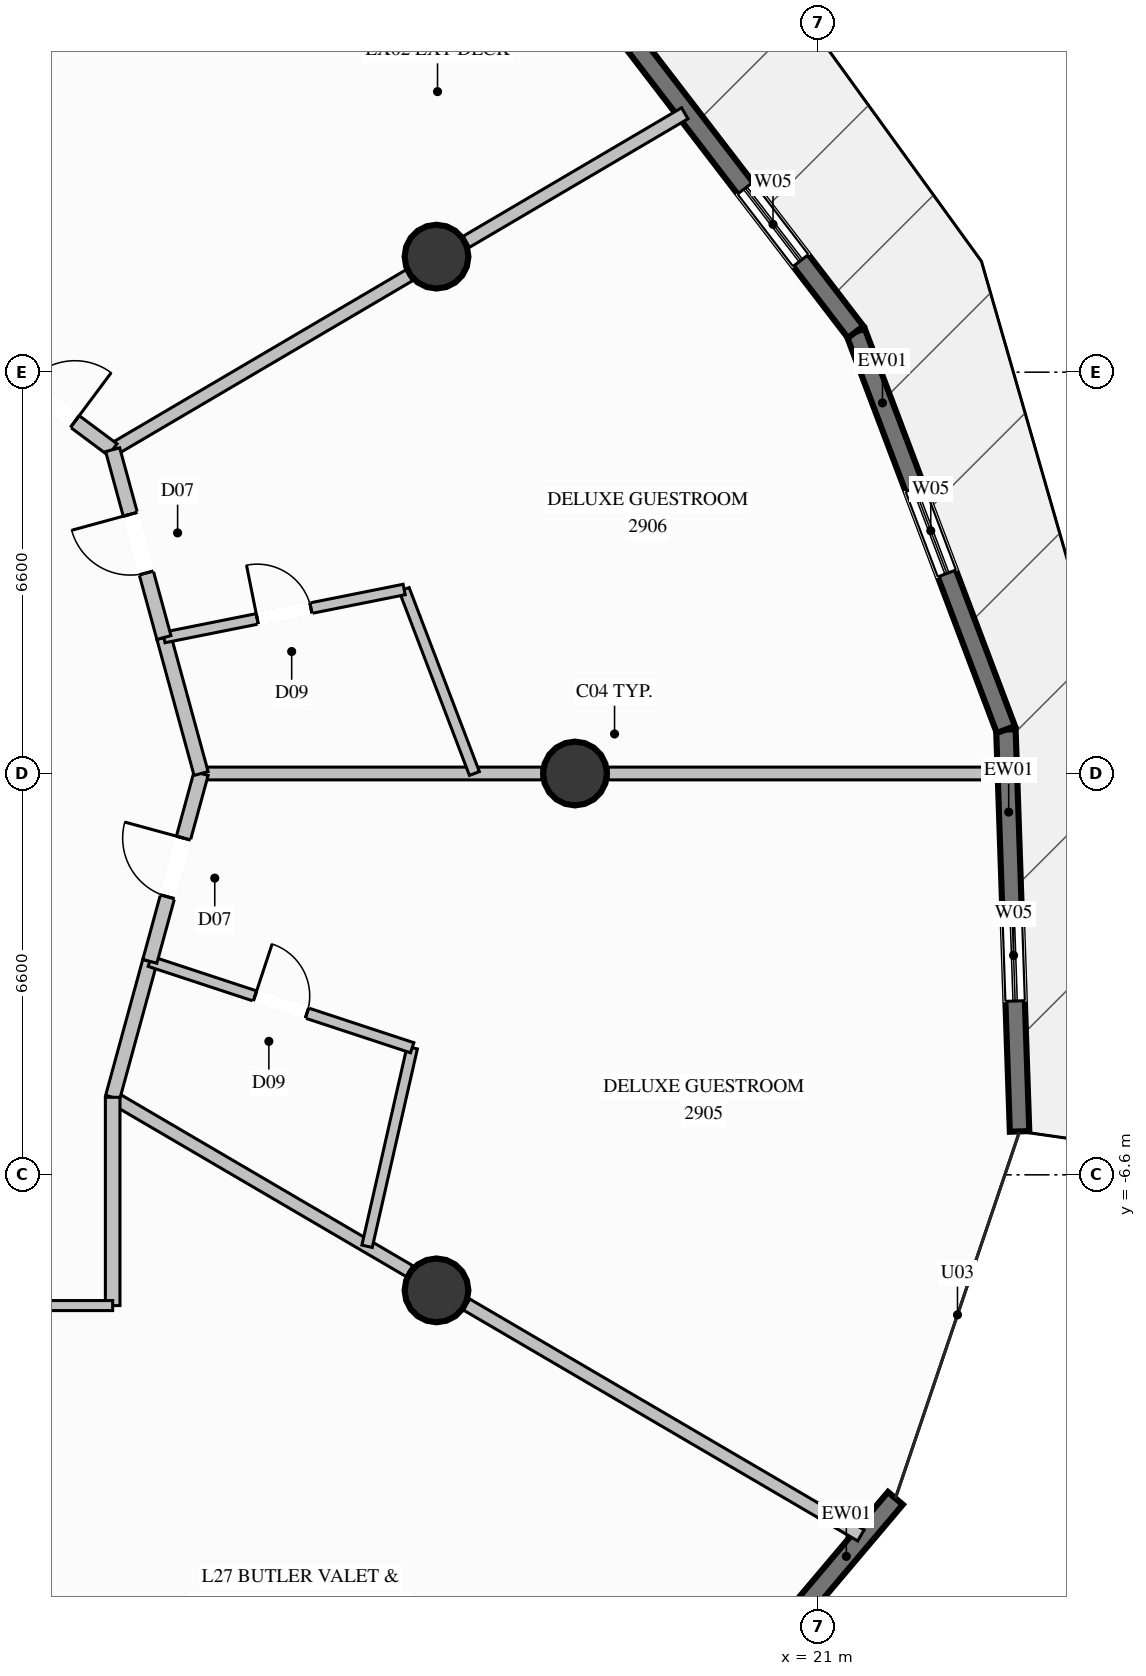
"""IFC4 building model, lengths in metres.
Left out: names, types, materials, properties, quantities, classifications, styles, units other than length and angle.
Written with IfcOpenShell. Run it as: python <this file> out.ifc"""

import sys

from ifc_helpers import new_model, si_unit, direction, frame, frame_2d, origin, origin_2d, place, context, subcontext, project, spatial, rectangle, circle, extrude, element, fill, save


model = new_model("IFC4")
c1 = context("Model", 3, precision=1e-05, world=origin(), true_north=direction((0.0, 1.0)))
c2 = subcontext(c1, "Body", "Model", "MODEL_VIEW")
j1 = project(units=[si_unit("LENGTHUNIT", "METRE"), si_unit("PLANEANGLEUNIT", "RADIAN")], contexts=[c1])
p1 = place(None, origin())
s1 = spatial("IfcSite", under=j1, at=p1, CompositionType="ELEMENT")
p2 = place(p1, origin())
s2 = spatial("IfcBuilding", under=s1, at=p2, CompositionType="ELEMENT")
p3 = place(p2, frame((0.0, 0.0, 109.8)))
s3 = spatial("IfcBuildingStorey", under=s2, at=p3, CompositionType="ELEMENT", Elevation=109.8)
for number, where, z_axis, x_axis in (
    (1, (17.0, 0.0, 0.0), (0.0, 0.0, 1.0), (1.0, 0.0, 0.0)),
    (2, (14.722, 8.5, 0.0), (0.0, 0.0, 1.0), (1.0, 0.0, 0.0)),
    (3, (14.722, -8.5, 0.0), (0.0, 0.0, 1.0), (1.0, 0.0, 0.0)),
):
    element("IfcColumn", number, at=place(p3, frame(where, z_axis=z_axis, x_axis=x_axis)), inside=s3, PredefinedType="COLUMN", context=c2, shape_type="SweptSolid", body=[
        extrude(circle(Radius=0.525, at=origin_2d()), origin(), (0.0, 0.0, 1.0), 3.6),
    ])
p4 = place(p3, frame((24.086, 0.723, 0.0), z_axis=(0.0, 0.0, 1.0), x_axis=(0.034040106065, -0.999420467661, 0.0)))
e4 = element("IfcWall", 4, at=p4, inside=s3, PredefinedType="SOLIDWALL", context=c2, shape_type="SweptSolid", body=[
    extrude(rectangle(XDim=6.613, YDim=0.32, at=frame_2d((3.306, 0.0))), origin(), (0.0, 0.0, 1.0), 3.35),
])
p5 = place(p4, frame((2.967, 0.0, 0.85)))
e5 = element("IfcOpeningElement", 5, at=p5, cuts=e4, PredefinedType="OPENING", context=c2, shape_type="SweptSolid", body=[
    extrude(rectangle(XDim=1.5, YDim=1.2, at=frame_2d((0.75, 0.6))), frame((0.0, 0.17, 0.0), z_axis=(0.0, -1.0, 0.0), x_axis=(1.0, 0.0, 0.0)), (0.0, 0.0, 1.0), 0.34),
])
p6 = place(p3, frame((21.615, 7.261, 0.0), z_axis=(0.0, 0.0, 1.0), x_axis=(0.353526231911, -0.93542461126, 0.0)))
e6 = element("IfcWall", 6, at=p6, inside=s3, PredefinedType="SOLIDWALL", context=c2, shape_type="SweptSolid", body=[
    extrude(rectangle(XDim=6.99, YDim=0.32, at=frame_2d((3.495, 0.0))), origin(), (0.0, 0.0, 1.0), 3.35),
])
p7 = place(p6, frame((2.745, 0.0, 0.85)))
e7 = element("IfcOpeningElement", 7, at=p7, cuts=e6, PredefinedType="OPENING", context=c2, shape_type="SweptSolid", body=[
    extrude(rectangle(XDim=1.5, YDim=1.2, at=frame_2d((0.75, 0.6))), frame((0.0, 0.17, 0.0), z_axis=(0.0, -1.0, 0.0), x_axis=(1.0, 0.0, 0.0)), (0.0, 0.0, 1.0), 0.34),
])
p8 = place(p3, frame((17.142, 13.089, 0.0), z_axis=(0.0, 0.0, 1.0), x_axis=(0.608831916989, -0.793299247986, 0.0)))
e8 = element("IfcWall", 8, at=p8, inside=s3, PredefinedType="SOLIDWALL", context=c2, shape_type="SweptSolid", body=[
    extrude(rectangle(XDim=7.347, YDim=0.32, at=frame_2d((3.673, 0.0))), origin(), (0.0, 0.0, 1.0), 3.35),
])
p9 = place(p8, frame((4.365, 0.0, 0.85)))
e9 = element("IfcOpeningElement", 9, at=p9, cuts=e8, PredefinedType="OPENING", context=c2, shape_type="SweptSolid", body=[
    extrude(rectangle(XDim=1.5, YDim=1.2, at=frame_2d((0.75, 0.6))), frame((0.0, 0.17, 0.0), z_axis=(0.0, -1.0, 0.0), x_axis=(1.0, 0.0, 0.0)), (0.0, 0.0, 1.0), 0.34),
])
p10 = place(p3, frame((22.269, -11.919, 0.0), z_axis=(0.0, 0.0, 1.0), x_axis=(-0.645278763483, -0.763947195425, 0.0)))
e10 = element("IfcWall", 10, at=p10, inside=s3, PredefinedType="SOLIDWALL", context=c2, shape_type="SweptSolid", body=[
    extrude(rectangle(XDim=6.369, YDim=0.32, at=frame_2d((3.185, 0.0))), origin(), (0.0, 0.0, 1.0), 3.35),
])
p11 = place(p10, frame((2.751, 0.0, 0.35)))
e11 = element("IfcOpeningElement", 11, at=p11, cuts=e10, PredefinedType="OPENING", context=c2, shape_type="SweptSolid", body=[
    extrude(rectangle(XDim=1.8, YDim=2.6, at=frame_2d((0.9, 1.3))), frame((0.0, 0.17, 0.0), z_axis=(0.0, -1.0, 0.0), x_axis=(1.0, 0.0, 0.0)), (0.0, 0.0, 1.0), 0.34),
])
p12 = place(p3, frame((10.85, 0.0, 0.0), z_axis=(0.0, 0.0, 1.0), x_axis=(1.0, 0.0, 0.0)))
e12 = element("IfcWall", 12, at=p12, inside=s3, PredefinedType="PARTITIONING", context=c2, shape_type="SweptSolid", body=[
    extrude(rectangle(XDim=5.605, YDim=0.21, at=frame_2d((2.802, 0.0))), origin(), (0.0, 0.0, 1.0), 2.421),
])
p13 = place(p3, frame((17.545, 0.0, 0.0), z_axis=(0.0, 0.0, 1.0), x_axis=(1.0, 0.0, 0.0)))
e13 = element("IfcWall", 13, at=p13, inside=s3, PredefinedType="PARTITIONING", context=c2, shape_type="SweptSolid", body=[
    extrude(rectangle(XDim=6.526, YDim=0.21, at=frame_2d((3.263, 0.0))), origin(), (0.0, 0.0, 1.0), 2.421),
])
p14 = place(p3, frame((9.396, 5.325, 0.0), z_axis=(0.0, 0.0, 1.0), x_axis=(0.862032950085, 0.506852239778, 0.0)))
e14 = element("IfcWall", 14, at=p14, inside=s3, PredefinedType="PARTITIONING", context=c2, shape_type="SweptSolid", body=[
    extrude(rectangle(XDim=5.656, YDim=0.21, at=frame_2d((2.828, 0.0))), origin(), (0.0, 0.0, 1.0), 2.791),
])
p15 = place(p3, frame((15.21, 8.743, 0.0), z_axis=(0.0, 0.0, 1.0), x_axis=(0.862004936616, 0.506899880894, 0.0)))
e15 = element("IfcWall", 15, at=p15, inside=s3, PredefinedType="PARTITIONING", context=c2, shape_type="SweptSolid", body=[
    extrude(rectangle(XDim=4.17, YDim=0.21, at=frame_2d((2.085, 0.0))), origin(), (0.0, 0.0, 1.0), 3.35),
])
p16 = place(p3, frame((9.396, -5.325, 0.0), z_axis=(0.0, 0.0, 1.0), x_axis=(0.862912125579, -0.505353998232, 0.0)))
e16 = element("IfcWall", 16, at=p16, inside=s3, PredefinedType="PARTITIONING", context=c2, shape_type="SweptSolid", body=[
    extrude(rectangle(XDim=5.658, YDim=0.21, at=frame_2d((2.829, 0.0))), origin(), (0.0, 0.0, 1.0), 2.791),
])
p17 = place(p3, frame((15.215, -8.732, 0.0), z_axis=(0.0, 0.0, 1.0), x_axis=(0.862960241997, -0.505271828556, 0.0)))
e17 = element("IfcWall", 17, at=p17, inside=s3, PredefinedType="PARTITIONING", context=c2, shape_type="SweptSolid", body=[
    extrude(rectangle(XDim=7.517, YDim=0.21, at=frame_2d((3.758, 0.0))), origin(), (0.0, 0.0, 1.0), 3.35),
])
p18 = place(p3, frame((7.35, 6.85, 0.0), z_axis=(0.0, 0.0, 1.0), x_axis=(0.8017416961, -0.597670689205, 0.0)))
e18 = element("IfcWall", 18, at=p18, inside=s3, PredefinedType="PARTITIONING", context=c2, shape_type="SweptSolid", body=[
    extrude(rectangle(XDim=2.552, YDim=0.24, at=frame_2d((1.276, 0.0))), origin(), (0.0, 0.0, 1.0), 3.35),
])
p19 = place(p18, frame((0.776, 0.0, 0.0)))
e19 = element("IfcOpeningElement", 19, at=p19, cuts=e18, PredefinedType="OPENING", context=c2, shape_type="SweptSolid", body=[
    extrude(rectangle(XDim=1.0, YDim=2.2, at=frame_2d((0.5, 1.1))), frame((0.0, 0.13, 0.0), z_axis=(0.0, -1.0, 0.0), x_axis=(1.0, 0.0, 0.0)), (0.0, 0.0, 1.0), 0.26),
])
p20 = place(p3, frame((9.396, -5.325, 0.0), z_axis=(0.0, 0.0, 1.0), x_axis=(0.263643210908, 0.964620265878, 0.0)))
e20 = element("IfcWall", 20, at=p20, inside=s3, PredefinedType="PARTITIONING", context=c2, shape_type="SweptSolid", body=[
    extrude(rectangle(XDim=2.318, YDim=0.24, at=frame_2d((1.159, 0.0))), origin(), (0.0, 0.0, 1.0), 3.35),
])
p21 = place(p3, frame((13.58, -7.775, 0.0), z_axis=(0.0, 0.0, 1.0), x_axis=(0.221599041774, 0.975137869578, 0.0)))
e21 = element("IfcWall", 21, at=p21, inside=s3, PredefinedType="PLUMBINGWALL", context=c2, shape_type="SweptSolid", body=[
    extrude(rectangle(XDim=3.348, YDim=0.175, at=frame_2d((1.674, 0.0))), origin(), (0.0, 0.0, 1.0), 3.35),
])
p22 = place(p3, frame((10.007, -3.089, 0.0), z_axis=(0.0, 0.0, 1.0), x_axis=(0.949827092004, -0.312775471057, 0.0)))
e22 = element("IfcWall", 22, at=p22, inside=s3, PredefinedType="PLUMBINGWALL", context=c2, shape_type="SweptSolid", body=[
    extrude(rectangle(XDim=4.543, YDim=0.175, at=frame_2d((2.271, 0.0))), origin(), (0.0, 0.0, 1.0), 3.35),
])
p23 = place(p22, frame((1.821, 0.0, 0.0)))
e23 = element("IfcOpeningElement", 23, at=p23, cuts=e22, PredefinedType="OPENING", context=c2, shape_type="SweptSolid", body=[
    extrude(rectangle(XDim=0.9, YDim=2.1, at=frame_2d((0.45, 1.05))), frame((0.0, 0.098, 0.0), z_axis=(0.0, -1.0, 0.0), x_axis=(1.0, 0.0, 0.0)), (0.0, 0.0, 1.0), 0.195),
])
p24 = place(p3, frame((10.007, -3.089, 0.0), z_axis=(0.0, 0.0, 1.0), x_axis=(0.263272237376, 0.964721581093, 0.0)))
e24 = element("IfcWall", 24, at=p24, inside=s3, PredefinedType="PARTITIONING", context=c2, shape_type="SweptSolid", body=[
    extrude(rectangle(XDim=3.202, YDim=0.24, at=frame_2d((1.601, 0.0))), origin(), (0.0, 0.0, 1.0), 2.985),
])
p25 = place(p24, frame((1.101, 0.0, 0.0)))
e25 = element("IfcOpeningElement", 25, at=p25, cuts=e24, PredefinedType="OPENING", context=c2, shape_type="SweptSolid", body=[
    extrude(rectangle(XDim=1.0, YDim=2.2, at=frame_2d((0.5, 1.1))), frame((0.0, 0.13, 0.0), z_axis=(0.0, -1.0, 0.0), x_axis=(1.0, 0.0, 0.0)), (0.0, 0.0, 1.0), 0.26),
])
p26 = place(p3, frame((10.85, 0.0, 0.0), z_axis=(0.0, 0.0, 1.0), x_axis=(-0.263616426241, 0.964627586074, 0.0)))
e26 = element("IfcWall", 26, at=p26, inside=s3, PredefinedType="PARTITIONING", context=c2, shape_type="SweptSolid", body=[
    extrude(rectangle(XDim=2.318, YDim=0.24, at=frame_2d((1.159, 0.0))), origin(), (0.0, 0.0, 1.0), 2.985),
])
p27 = place(p3, frame((15.345, 0.0, 0.0), z_axis=(0.0, 0.0, 1.0), x_axis=(-0.35661902988, 0.934249895653, 0.0)))
e27 = element("IfcWall", 27, at=p27, inside=s3, PredefinedType="PLUMBINGWALL", context=c2, shape_type="SweptSolid", body=[
    extrude(rectangle(XDim=3.239, YDim=0.175, at=frame_2d((1.619, 0.0))), origin(), (0.0, 0.0, 1.0), 3.35),
])
p28 = place(p3, frame((10.239, 2.236, 0.0), z_axis=(0.0, 0.0, 1.0), x_axis=(0.980599315693, 0.196022912085, 0.0)))
e28 = element("IfcWall", 28, at=p28, inside=s3, PredefinedType="PLUMBINGWALL", context=c2, shape_type="SweptSolid", body=[
    extrude(rectangle(XDim=4.029, YDim=0.175, at=frame_2d((2.015, 0.0))), origin(), (0.0, 0.0, 1.0), 3.35),
])
p29 = place(p28, frame((1.565, 0.0, 0.0)))
e29 = element("IfcOpeningElement", 29, at=p29, cuts=e28, PredefinedType="OPENING", context=c2, shape_type="SweptSolid", body=[
    extrude(rectangle(XDim=0.9, YDim=2.1, at=frame_2d((0.45, 1.05))), frame((0.0, 0.098, 0.0), z_axis=(0.0, -1.0, 0.0), x_axis=(1.0, 0.0, 0.0)), (0.0, 0.0, 1.0), 0.195),
])
p30 = place(p3, frame((10.239, 2.236, 0.0), z_axis=(0.0, 0.0, 1.0), x_axis=(-0.26329160366, 0.964716295831, 0.0)))
e30 = element("IfcWall", 30, at=p30, inside=s3, PredefinedType="PARTITIONING", context=c2, shape_type="SweptSolid", body=[
    extrude(rectangle(XDim=3.202, YDim=0.24, at=frame_2d((1.601, 0.0))), origin(), (0.0, 0.0, 1.0), 3.35),
])
p31 = place(p30, frame((1.101, 0.0, 0.0)))
e31 = element("IfcOpeningElement", 31, at=p31, cuts=e30, PredefinedType="OPENING", context=c2, shape_type="SweptSolid", body=[
    extrude(rectangle(XDim=1.0, YDim=2.2, at=frame_2d((0.5, 1.1))), frame((0.0, 0.13, 0.0), z_axis=(0.0, -1.0, 0.0), x_axis=(1.0, 0.0, 0.0)), (0.0, 0.0, 1.0), 0.26),
])
p32 = place(p3, frame((5.168, -8.75, 0.0), z_axis=(0.0, 0.0, 1.0), x_axis=(0.319791389232, -0.947487977429, 0.0)))
e32 = element("IfcWall", 32, at=p32, inside=s3, PredefinedType="PARTITIONING", context=c2, shape_type="SweptSolid", body=[
    extrude(rectangle(XDim=12.468, YDim=0.21, at=frame_2d((6.234, 0.0))), origin(), (0.0, 0.0, 1.0), 3.35),
])
p33 = place(p3, frame((9.396, -8.75, 0.0), z_axis=(0.0, 0.0, 1.0), x_axis=(0.0, 1.0, 0.0)))
e33 = element("IfcWall", 33, at=p33, inside=s3, PredefinedType="PARTITIONING", context=c2, shape_type="SweptSolid", body=[
    extrude(rectangle(XDim=3.425, YDim=0.24, at=frame_2d((1.712, 0.0))), origin(), (0.0, 0.0, 1.0), 3.35),
])
p34 = place(p3, frame((5.168, -8.75, 0.0), z_axis=(0.0, 0.0, 1.0), x_axis=(1.0, 0.0, 0.0)))
e34 = element("IfcWall", 34, at=p34, inside=s3, PredefinedType="PARTITIONING", context=c2, shape_type="SweptSolid", body=[
    extrude(rectangle(XDim=4.228, YDim=0.165, at=frame_2d((2.114, 0.0))), origin(), (0.0, 0.0, 1.0), 3.35),
])
p35 = place(p34, frame((1.639, 0.0, 0.0)))
e35 = element("IfcOpeningElement", 35, at=p35, cuts=e34, PredefinedType="OPENING", context=c2, shape_type="SweptSolid", body=[
    extrude(rectangle(XDim=0.95, YDim=2.1, at=frame_2d((0.475, 1.05))), frame((0.0, 0.093, 0.0), z_axis=(0.0, -1.0, 0.0), x_axis=(1.0, 0.0, 0.0)), (0.0, 0.0, 1.0), 0.185),
])
p36 = place(p5, origin())
e36 = element("IfcWindow", 36, at=p36, inside=s3, PartitioningType="SINGLE_PANEL", PredefinedType="WINDOW", context=c2, shape_type="SweptSolid", body=[
    extrude(rectangle(XDim=1.5, YDim=1.2, at=frame_2d((0.75, 0.6))), frame((0.0, 0.03, 0.0), z_axis=(0.0, -1.0, 0.0), x_axis=(1.0, 0.0, 0.0)), (0.0, 0.0, 1.0), 0.06),
])
fill(e5, e36)
p37 = place(p7, origin())
e37 = element("IfcWindow", 37, at=p37, inside=s3, PartitioningType="SINGLE_PANEL", PredefinedType="WINDOW", context=c2, shape_type="SweptSolid", body=[
    extrude(rectangle(XDim=1.5, YDim=1.2, at=frame_2d((0.75, 0.6))), frame((0.0, 0.03, 0.0), z_axis=(0.0, -1.0, 0.0), x_axis=(1.0, 0.0, 0.0)), (0.0, 0.0, 1.0), 0.06),
])
fill(e7, e37)
p38 = place(p9, origin())
e38 = element("IfcWindow", 38, at=p38, inside=s3, PartitioningType="SINGLE_PANEL", PredefinedType="WINDOW", context=c2, shape_type="SweptSolid", body=[
    extrude(rectangle(XDim=1.5, YDim=1.2, at=frame_2d((0.75, 0.6))), frame((0.0, 0.03, 0.0), z_axis=(0.0, -1.0, 0.0), x_axis=(1.0, 0.0, 0.0)), (0.0, 0.0, 1.0), 0.06),
])
fill(e9, e38)
p39 = place(p19, origin())
e39 = element("IfcDoor", 39, at=p39, inside=s3, OperationType="SINGLE_SWING_RIGHT", PredefinedType="DOOR", context=c2, shape_type="SweptSolid", body=[
    extrude(rectangle(XDim=1.0, YDim=2.2, at=frame_2d((0.5, 1.1))), frame((0.0, 0.025, 0.0), z_axis=(0.0, -1.0, 0.0), x_axis=(1.0, 0.0, 0.0)), (0.0, 0.0, 1.0), 0.05),
])
fill(e19, e39)
p40 = place(p23, origin())
e40 = element("IfcDoor", 40, at=p40, inside=s3, OperationType="SINGLE_SWING_LEFT", PredefinedType="DOOR", context=c2, shape_type="SweptSolid", body=[
    extrude(rectangle(XDim=0.9, YDim=2.1, at=frame_2d((0.45, 1.05))), frame((0.0, 0.025, 0.0), z_axis=(0.0, -1.0, 0.0), x_axis=(1.0, 0.0, 0.0)), (0.0, 0.0, 1.0), 0.05),
])
fill(e23, e40)
p41 = place(p25, origin())
e41 = element("IfcDoor", 41, at=p41, inside=s3, OperationType="SINGLE_SWING_RIGHT", PredefinedType="DOOR", context=c2, shape_type="SweptSolid", body=[
    extrude(rectangle(XDim=1.0, YDim=2.2, at=frame_2d((0.5, 1.1))), frame((0.0, 0.025, 0.0), z_axis=(0.0, -1.0, 0.0), x_axis=(1.0, 0.0, 0.0)), (0.0, 0.0, 1.0), 0.05),
])
fill(e25, e41)
p42 = place(p29, origin())
e42 = element("IfcDoor", 42, at=p42, inside=s3, OperationType="SINGLE_SWING_LEFT", PredefinedType="DOOR", context=c2, shape_type="SweptSolid", body=[
    extrude(rectangle(XDim=0.9, YDim=2.1, at=frame_2d((0.45, 1.05))), frame((0.0, 0.025, 0.0), z_axis=(0.0, -1.0, 0.0), x_axis=(1.0, 0.0, 0.0)), (0.0, 0.0, 1.0), 0.05),
])
fill(e29, e42)
p43 = place(p31, origin())
e43 = element("IfcDoor", 43, at=p43, inside=s3, OperationType="SINGLE_SWING_RIGHT", PredefinedType="DOOR", context=c2, shape_type="SweptSolid", body=[
    extrude(rectangle(XDim=1.0, YDim=2.2, at=frame_2d((0.5, 1.1))), frame((0.0, 0.025, 0.0), z_axis=(0.0, -1.0, 0.0), x_axis=(1.0, 0.0, 0.0)), (0.0, 0.0, 1.0), 0.05),
])
fill(e31, e43)
save(model, sys.argv[1])
